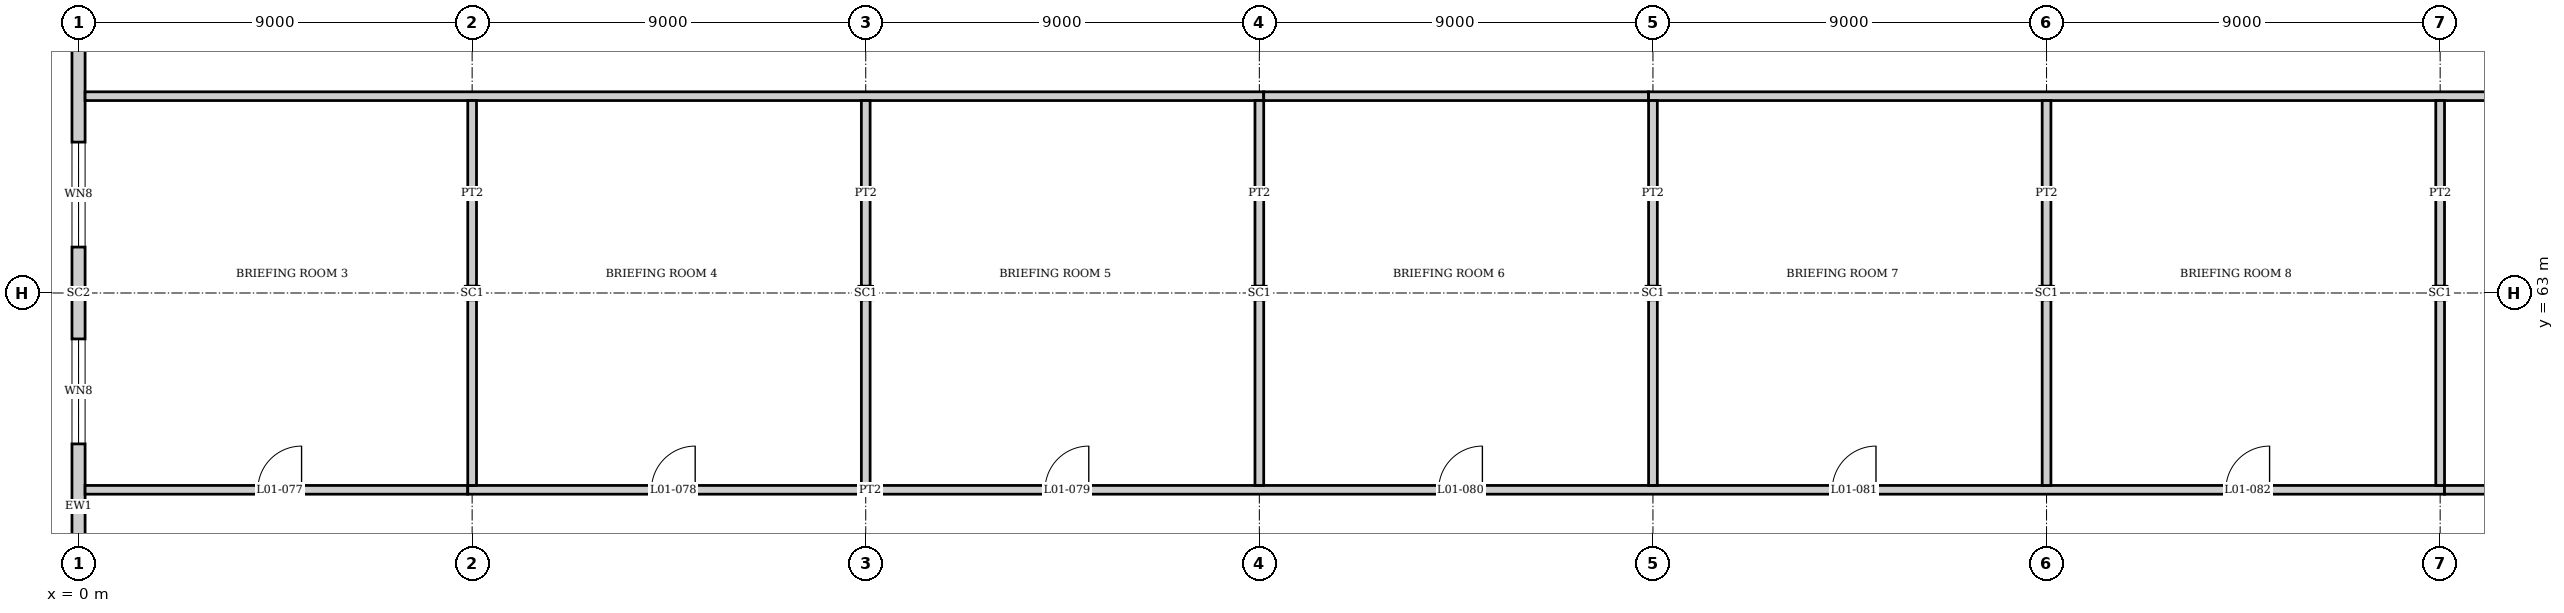
"""IFC4 building model, lengths in metres.
Left out: names, types, materials, properties, quantities, classifications, styles, units other than length and angle.
Written with IfcOpenShell. Run it as: python <this file> out.ifc"""

import sys

from ifc_helpers import new_model, si_unit, direction, frame, frame_2d, origin, origin_2d, place, context, subcontext, project, spatial, rectangle, i_section, extrude, element, fill, save


model = new_model("IFC4")
c1 = context("Model", 3, precision=1e-05, world=origin(), true_north=direction((0.0, 1.0)))
c2 = subcontext(c1, "Body", "Model", "MODEL_VIEW")
j1 = project(units=[si_unit("LENGTHUNIT", "METRE"), si_unit("PLANEANGLEUNIT", "RADIAN")], contexts=[c1])
p1 = place(None, origin())
s1 = spatial("IfcSite", under=j1, at=p1, CompositionType="ELEMENT")
p2 = place(p1, origin())
s2 = spatial("IfcBuilding", under=s1, at=p2, CompositionType="ELEMENT")
p3 = place(p2, frame((0.0, 0.0, 6.0)))
s3 = spatial("IfcBuildingStorey", under=s2, at=p3, CompositionType="ELEMENT", Elevation=6.0)
p4 = place(p3, frame((0.0, 63.0, 0.0), z_axis=(0.0, 0.0, 1.0), x_axis=(0.0, 1.0, 0.0)))
e1 = element("IfcColumn", 1, at=p4, inside=s3, PredefinedType="COLUMN", context=c2, shape_type="SweptSolid", body=[
    extrude(i_section(OverallWidth=0.256, OverallDepth=0.26, WebThickness=0.01, FlangeThickness=0.017, at=origin_2d()), origin(), (0.0, 0.0, 1.0), 4.5),
])
for number, where, z_axis, x_axis in (
    (2, (9.0, 63.0, 0.0), (0.0, 0.0, 1.0), (0.0, 1.0, 0.0)),
    (3, (18.0, 63.0, 0.0), (0.0, 0.0, 1.0), (0.0, 1.0, 0.0)),
    (4, (27.0, 63.0, 0.0), (0.0, 0.0, 1.0), (0.0, 1.0, 0.0)),
    (5, (36.0, 63.0, 0.0), (0.0, 0.0, 1.0), (0.0, 1.0, 0.0)),
    (6, (45.0, 63.0, 0.0), (0.0, 0.0, 1.0), (0.0, 1.0, 0.0)),
    (7, (54.0, 63.0, 0.0), (0.0, 0.0, 1.0), (0.0, 1.0, 0.0)),
):
    element("IfcColumn", number, at=place(p3, frame(where, z_axis=z_axis, x_axis=x_axis)), inside=s3, PredefinedType="COLUMN", context=c2, shape_type="SweptSolid", body=[
        extrude(i_section(OverallWidth=0.307, OverallDepth=0.315, WebThickness=0.012, FlangeThickness=0.019, at=origin_2d()), origin(), (0.0, 0.0, 1.0), 4.5),
    ])
p5 = place(p3, frame((0.0, 54.0, 0.0), z_axis=(0.0, 0.0, 1.0), x_axis=(0.0, 1.0, 0.0)))
e8 = element("IfcWall", 8, at=p5, inside=s3, PredefinedType="SOLIDWALL", context=c2, shape_type="SweptSolid", body=[
    extrude(rectangle(XDim=8.872, YDim=0.3, at=frame_2d((4.436, 0.0))), origin(), (0.0, 0.0, 1.0), 3.947),
])
p6 = place(p5, frame((1.8, 0.0, 0.6)))
e9 = element("IfcOpeningElement", 9, at=p6, cuts=e8, PredefinedType="OPENING", context=c2, shape_type="SweptSolid", body=[
    extrude(rectangle(XDim=0.9, YDim=2.7, at=frame_2d((0.45, 1.35))), frame((0.0, 0.16, 0.0), z_axis=(0.0, -1.0, 0.0), x_axis=(1.0, 0.0, 0.0)), (0.0, 0.0, 1.0), 0.32),
])
p7 = place(p5, frame((5.55, 0.0, 0.9)))
e10 = element("IfcOpeningElement", 10, at=p7, cuts=e8, PredefinedType="OPENING", context=c2, shape_type="SweptSolid", body=[
    extrude(rectangle(XDim=2.4, YDim=2.1, at=frame_2d((1.2, 1.05))), frame((0.0, 0.16, 0.0), z_axis=(0.0, -1.0, 0.0), x_axis=(1.0, 0.0, 0.0)), (0.0, 0.0, 1.0), 0.32),
])
p8 = place(p3, frame((0.0, 63.128, 0.0), z_axis=(0.0, 0.0, 1.0), x_axis=(0.0, 1.0, 0.0)))
e11 = element("IfcWall", 11, at=p8, inside=s3, PredefinedType="SOLIDWALL", context=c2, shape_type="SweptSolid", body=[
    extrude(rectangle(XDim=8.744, YDim=0.3, at=frame_2d((4.372, 0.0))), origin(), (0.0, 0.0, 1.0), 3.947),
])
p9 = place(p8, frame((0.922, 0.0, 0.9)))
e12 = element("IfcOpeningElement", 12, at=p9, cuts=e11, PredefinedType="OPENING", context=c2, shape_type="SweptSolid", body=[
    extrude(rectangle(XDim=2.4, YDim=2.1, at=frame_2d((1.2, 1.05))), frame((0.0, 0.16, 0.0), z_axis=(0.0, -1.0, 0.0), x_axis=(1.0, 0.0, 0.0)), (0.0, 0.0, 1.0), 0.32),
])
p10 = place(p8, frame((6.172, 0.0, 0.6)))
e13 = element("IfcOpeningElement", 13, at=p10, cuts=e11, PredefinedType="OPENING", context=c2, shape_type="SweptSolid", body=[
    extrude(rectangle(XDim=0.9, YDim=2.7, at=frame_2d((0.45, 1.35))), frame((0.0, 0.16, 0.0), z_axis=(0.0, -1.0, 0.0), x_axis=(1.0, 0.0, 0.0)), (0.0, 0.0, 1.0), 0.32),
])
p11 = place(p3, frame((0.15, 58.5, 0.0), z_axis=(0.0, 0.0, 1.0), x_axis=(1.0, 0.0, 0.0)))
e14 = element("IfcWall", 14, at=p11, inside=s3, PredefinedType="PARTITIONING", context=c2, shape_type="SweptSolid", body=[
    extrude(rectangle(XDim=8.75, YDim=0.2, at=frame_2d((4.375, 0.0))), origin(), (0.0, 0.0, 1.0), 3.994),
])
p12 = place(p11, frame((3.95, 0.0, 0.0)))
e15 = element("IfcOpeningElement", 15, at=p12, cuts=e14, PredefinedType="OPENING", context=c2, shape_type="SweptSolid", body=[
    extrude(rectangle(XDim=1.0, YDim=2.1, at=frame_2d((0.5, 1.05))), frame((0.0, 0.11, 0.0), z_axis=(0.0, -1.0, 0.0), x_axis=(1.0, 0.0, 0.0)), (0.0, 0.0, 1.0), 0.22),
])
p13 = place(p3, frame((8.9, 58.5, 0.0), z_axis=(0.0, 0.0, 1.0), x_axis=(1.0, 0.0, 0.0)))
e16 = element("IfcWall", 16, at=p13, inside=s3, PredefinedType="PARTITIONING", context=c2, shape_type="SweptSolid", body=[
    extrude(rectangle(XDim=45.2, YDim=0.2, at=frame_2d((22.6, 0.0))), origin(), (0.0, 0.0, 1.0), 3.947),
])
p14 = place(p13, frame((4.2, 0.0, 0.0)))
e17 = element("IfcOpeningElement", 17, at=p14, cuts=e16, PredefinedType="OPENING", context=c2, shape_type="SweptSolid", body=[
    extrude(rectangle(XDim=1.0, YDim=2.1, at=frame_2d((0.5, 1.05))), frame((0.0, 0.11, 0.0), z_axis=(0.0, -1.0, 0.0), x_axis=(1.0, 0.0, 0.0)), (0.0, 0.0, 1.0), 0.22),
])
p15 = place(p13, frame((13.2, 0.0, 0.0)))
e18 = element("IfcOpeningElement", 18, at=p15, cuts=e16, PredefinedType="OPENING", context=c2, shape_type="SweptSolid", body=[
    extrude(rectangle(XDim=1.0, YDim=2.1, at=frame_2d((0.5, 1.05))), frame((0.0, 0.11, 0.0), z_axis=(0.0, -1.0, 0.0), x_axis=(1.0, 0.0, 0.0)), (0.0, 0.0, 1.0), 0.22),
])
p16 = place(p13, frame((22.2, 0.0, 0.0)))
e19 = element("IfcOpeningElement", 19, at=p16, cuts=e16, PredefinedType="OPENING", context=c2, shape_type="SweptSolid", body=[
    extrude(rectangle(XDim=1.0, YDim=2.1, at=frame_2d((0.5, 1.05))), frame((0.0, 0.11, 0.0), z_axis=(0.0, -1.0, 0.0), x_axis=(1.0, 0.0, 0.0)), (0.0, 0.0, 1.0), 0.22),
])
p17 = place(p13, frame((31.2, 0.0, 0.0)))
e20 = element("IfcOpeningElement", 20, at=p17, cuts=e16, PredefinedType="OPENING", context=c2, shape_type="SweptSolid", body=[
    extrude(rectangle(XDim=1.0, YDim=2.1, at=frame_2d((0.5, 1.05))), frame((0.0, 0.11, 0.0), z_axis=(0.0, -1.0, 0.0), x_axis=(1.0, 0.0, 0.0)), (0.0, 0.0, 1.0), 0.22),
])
p18 = place(p13, frame((40.2, 0.0, 0.0)))
e21 = element("IfcOpeningElement", 21, at=p18, cuts=e16, PredefinedType="OPENING", context=c2, shape_type="SweptSolid", body=[
    extrude(rectangle(XDim=1.0, YDim=2.1, at=frame_2d((0.5, 1.05))), frame((0.0, 0.11, 0.0), z_axis=(0.0, -1.0, 0.0), x_axis=(1.0, 0.0, 0.0)), (0.0, 0.0, 1.0), 0.22),
])
p19 = place(p3, frame((54.1, 58.5, 0.0), z_axis=(0.0, 0.0, 1.0), x_axis=(1.0, 0.0, 0.0)))
e22 = element("IfcWall", 22, at=p19, inside=s3, PredefinedType="PARTITIONING", context=c2, shape_type="SweptSolid", body=[
    extrude(rectangle(XDim=8.84, YDim=0.2, at=frame_2d((4.42, 0.0))), origin(), (0.0, 0.0, 1.0), 3.994),
])
p20 = place(p19, frame((4.0, 0.0, 0.0)))
e23 = element("IfcOpeningElement", 23, at=p20, cuts=e22, PredefinedType="OPENING", context=c2, shape_type="SweptSolid", body=[
    extrude(rectangle(XDim=1.0, YDim=2.1, at=frame_2d((0.5, 1.05))), frame((0.0, 0.11, 0.0), z_axis=(0.0, -1.0, 0.0), x_axis=(1.0, 0.0, 0.0)), (0.0, 0.0, 1.0), 0.22),
])
p21 = place(p3, frame((0.15, 67.5, 0.0), z_axis=(0.0, 0.0, 1.0), x_axis=(1.0, 0.0, 0.0)))
e24 = element("IfcWall", 24, at=p21, inside=s3, PredefinedType="PARTITIONING", context=c2, shape_type="SweptSolid", body=[
    extrude(rectangle(XDim=26.95, YDim=0.2, at=frame_2d((13.475, 0.0))), origin(), (0.0, 0.0, 1.0), 3.947),
])
p22 = place(p3, frame((27.1, 67.5, 0.0), z_axis=(0.0, 0.0, 1.0), x_axis=(1.0, 0.0, 0.0)))
e25 = element("IfcWall", 25, at=p22, inside=s3, PredefinedType="PARTITIONING", context=c2, shape_type="SweptSolid", body=[
    extrude(rectangle(XDim=8.8, YDim=0.2, at=frame_2d((4.4, 0.0))), origin(), (0.0, 0.0, 1.0), 3.994),
])
p23 = place(p3, frame((35.9, 67.5, 0.0), z_axis=(0.0, 0.0, 1.0), x_axis=(1.0, 0.0, 0.0)))
e26 = element("IfcWall", 26, at=p23, inside=s3, PredefinedType="PARTITIONING", context=c2, shape_type="SweptSolid", body=[
    extrude(rectangle(XDim=45.16, YDim=0.2, at=frame_2d((22.58, 0.0))), origin(), (0.0, 0.0, 1.0), 3.947),
])
p24 = place(p3, frame((9.0, 58.6, 0.0), z_axis=(0.0, 0.0, 1.0), x_axis=(0.0, 1.0, 0.0)))
e27 = element("IfcWall", 27, at=p24, inside=s3, PredefinedType="PARTITIONING", context=c2, shape_type="SweptSolid", body=[
    extrude(rectangle(XDim=4.242, YDim=0.2, at=frame_2d((2.121, 0.0))), origin(), (0.0, 0.0, 1.0), 3.994),
])
for number, where, z_axis, x_axis in (
    (28, (9.0, 63.157, 0.0), (0.0, 0.0, 1.0), (0.0, 1.0, 0.0)),
    (29, (18.0, 58.6, 0.0), (0.0, 0.0, 1.0), (0.0, 1.0, 0.0)),
    (30, (18.0, 63.157, 0.0), (0.0, 0.0, 1.0), (0.0, 1.0, 0.0)),
    (31, (27.0, 58.6, 0.0), (0.0, 0.0, 1.0), (0.0, 1.0, 0.0)),
):
    element("IfcWall", number, at=place(p3, frame(where, z_axis=z_axis, x_axis=x_axis)), inside=s3, PredefinedType="PARTITIONING", context=c2, shape_type="SweptSolid", body=[
        extrude(rectangle(XDim=4.242, YDim=0.2, at=frame_2d((2.121, 0.0))), origin(), (0.0, 0.0, 1.0), 3.947),
    ])
p25 = place(p3, frame((27.0, 63.157, 0.0), z_axis=(0.0, 0.0, 1.0), x_axis=(0.0, 1.0, 0.0)))
e32 = element("IfcWall", 32, at=p25, inside=s3, PredefinedType="PARTITIONING", context=c2, shape_type="SweptSolid", body=[
    extrude(rectangle(XDim=4.242, YDim=0.2, at=frame_2d((2.121, 0.0))), origin(), (0.0, 0.0, 1.0), 3.994),
])
p26 = place(p3, frame((36.0, 58.6, 0.0), z_axis=(0.0, 0.0, 1.0), x_axis=(0.0, 1.0, 0.0)))
e33 = element("IfcWall", 33, at=p26, inside=s3, PredefinedType="PARTITIONING", context=c2, shape_type="SweptSolid", body=[
    extrude(rectangle(XDim=4.242, YDim=0.2, at=frame_2d((2.121, 0.0))), origin(), (0.0, 0.0, 1.0), 3.947),
])
p27 = place(p3, frame((36.0, 63.157, 0.0), z_axis=(0.0, 0.0, 1.0), x_axis=(0.0, 1.0, 0.0)))
e34 = element("IfcWall", 34, at=p27, inside=s3, PredefinedType="PARTITIONING", context=c2, shape_type="SweptSolid", body=[
    extrude(rectangle(XDim=4.242, YDim=0.2, at=frame_2d((2.121, 0.0))), origin(), (0.0, 0.0, 1.0), 3.994),
])
for number, where, z_axis, x_axis in (
    (35, (45.0, 58.6, 0.0), (0.0, 0.0, 1.0), (0.0, 1.0, 0.0)),
    (36, (45.0, 63.157, 0.0), (0.0, 0.0, 1.0), (0.0, 1.0, 0.0)),
):
    element("IfcWall", number, at=place(p3, frame(where, z_axis=z_axis, x_axis=x_axis)), inside=s3, PredefinedType="PARTITIONING", context=c2, shape_type="SweptSolid", body=[
        extrude(rectangle(XDim=4.242, YDim=0.2, at=frame_2d((2.121, 0.0))), origin(), (0.0, 0.0, 1.0), 3.947),
    ])
p28 = place(p3, frame((54.0, 58.6, 0.0), z_axis=(0.0, 0.0, 1.0), x_axis=(0.0, 1.0, 0.0)))
e37 = element("IfcWall", 37, at=p28, inside=s3, PredefinedType="PARTITIONING", context=c2, shape_type="SweptSolid", body=[
    extrude(rectangle(XDim=4.242, YDim=0.2, at=frame_2d((2.121, 0.0))), origin(), (0.0, 0.0, 1.0), 3.994),
])
p29 = place(p3, frame((54.0, 63.157, 0.0), z_axis=(0.0, 0.0, 1.0), x_axis=(0.0, 1.0, 0.0)))
e38 = element("IfcWall", 38, at=p29, inside=s3, PredefinedType="PARTITIONING", context=c2, shape_type="SweptSolid", body=[
    extrude(rectangle(XDim=4.242, YDim=0.2, at=frame_2d((2.121, 0.0))), origin(), (0.0, 0.0, 1.0), 3.947),
])
p30 = place(p7, origin())
e39 = element("IfcWindow", 39, at=p30, inside=s3, PartitioningType="SINGLE_PANEL", PredefinedType="WINDOW", context=c2, shape_type="SweptSolid", body=[
    extrude(rectangle(XDim=2.4, YDim=2.1, at=frame_2d((1.2, 1.05))), frame((0.0, 0.03, 0.0), z_axis=(0.0, -1.0, 0.0), x_axis=(1.0, 0.0, 0.0)), (0.0, 0.0, 1.0), 0.06),
])
fill(e10, e39)
p31 = place(p9, origin())
e40 = element("IfcWindow", 40, at=p31, inside=s3, PartitioningType="SINGLE_PANEL", PredefinedType="WINDOW", context=c2, shape_type="SweptSolid", body=[
    extrude(rectangle(XDim=2.4, YDim=2.1, at=frame_2d((1.2, 1.05))), frame((0.0, 0.03, 0.0), z_axis=(0.0, -1.0, 0.0), x_axis=(1.0, 0.0, 0.0)), (0.0, 0.0, 1.0), 0.06),
])
fill(e12, e40)
p32 = place(p12, origin())
e41 = element("IfcDoor", 41, at=p32, inside=s3, OperationType="SINGLE_SWING_RIGHT", PredefinedType="DOOR", context=c2, shape_type="SweptSolid", body=[
    extrude(rectangle(XDim=1.0, YDim=2.1, at=frame_2d((0.5, 1.05))), frame((0.0, 0.025, 0.0), z_axis=(0.0, -1.0, 0.0), x_axis=(1.0, 0.0, 0.0)), (0.0, 0.0, 1.0), 0.05),
])
fill(e15, e41)
p33 = place(p14, origin())
e42 = element("IfcDoor", 42, at=p33, inside=s3, OperationType="SINGLE_SWING_RIGHT", PredefinedType="DOOR", context=c2, shape_type="SweptSolid", body=[
    extrude(rectangle(XDim=1.0, YDim=2.1, at=frame_2d((0.5, 1.05))), frame((0.0, 0.025, 0.0), z_axis=(0.0, -1.0, 0.0), x_axis=(1.0, 0.0, 0.0)), (0.0, 0.0, 1.0), 0.05),
])
fill(e17, e42)
p34 = place(p15, origin())
e43 = element("IfcDoor", 43, at=p34, inside=s3, OperationType="SINGLE_SWING_RIGHT", PredefinedType="DOOR", context=c2, shape_type="SweptSolid", body=[
    extrude(rectangle(XDim=1.0, YDim=2.1, at=frame_2d((0.5, 1.05))), frame((0.0, 0.025, 0.0), z_axis=(0.0, -1.0, 0.0), x_axis=(1.0, 0.0, 0.0)), (0.0, 0.0, 1.0), 0.05),
])
fill(e18, e43)
p35 = place(p16, origin())
e44 = element("IfcDoor", 44, at=p35, inside=s3, OperationType="SINGLE_SWING_RIGHT", PredefinedType="DOOR", context=c2, shape_type="SweptSolid", body=[
    extrude(rectangle(XDim=1.0, YDim=2.1, at=frame_2d((0.5, 1.05))), frame((0.0, 0.025, 0.0), z_axis=(0.0, -1.0, 0.0), x_axis=(1.0, 0.0, 0.0)), (0.0, 0.0, 1.0), 0.05),
])
fill(e19, e44)
p36 = place(p17, origin())
e45 = element("IfcDoor", 45, at=p36, inside=s3, OperationType="SINGLE_SWING_RIGHT", PredefinedType="DOOR", context=c2, shape_type="SweptSolid", body=[
    extrude(rectangle(XDim=1.0, YDim=2.1, at=frame_2d((0.5, 1.05))), frame((0.0, 0.025, 0.0), z_axis=(0.0, -1.0, 0.0), x_axis=(1.0, 0.0, 0.0)), (0.0, 0.0, 1.0), 0.05),
])
fill(e20, e45)
p37 = place(p18, origin())
e46 = element("IfcDoor", 46, at=p37, inside=s3, OperationType="SINGLE_SWING_RIGHT", PredefinedType="DOOR", context=c2, shape_type="SweptSolid", body=[
    extrude(rectangle(XDim=1.0, YDim=2.1, at=frame_2d((0.5, 1.05))), frame((0.0, 0.025, 0.0), z_axis=(0.0, -1.0, 0.0), x_axis=(1.0, 0.0, 0.0)), (0.0, 0.0, 1.0), 0.05),
])
fill(e21, e46)
save(model, sys.argv[1])
